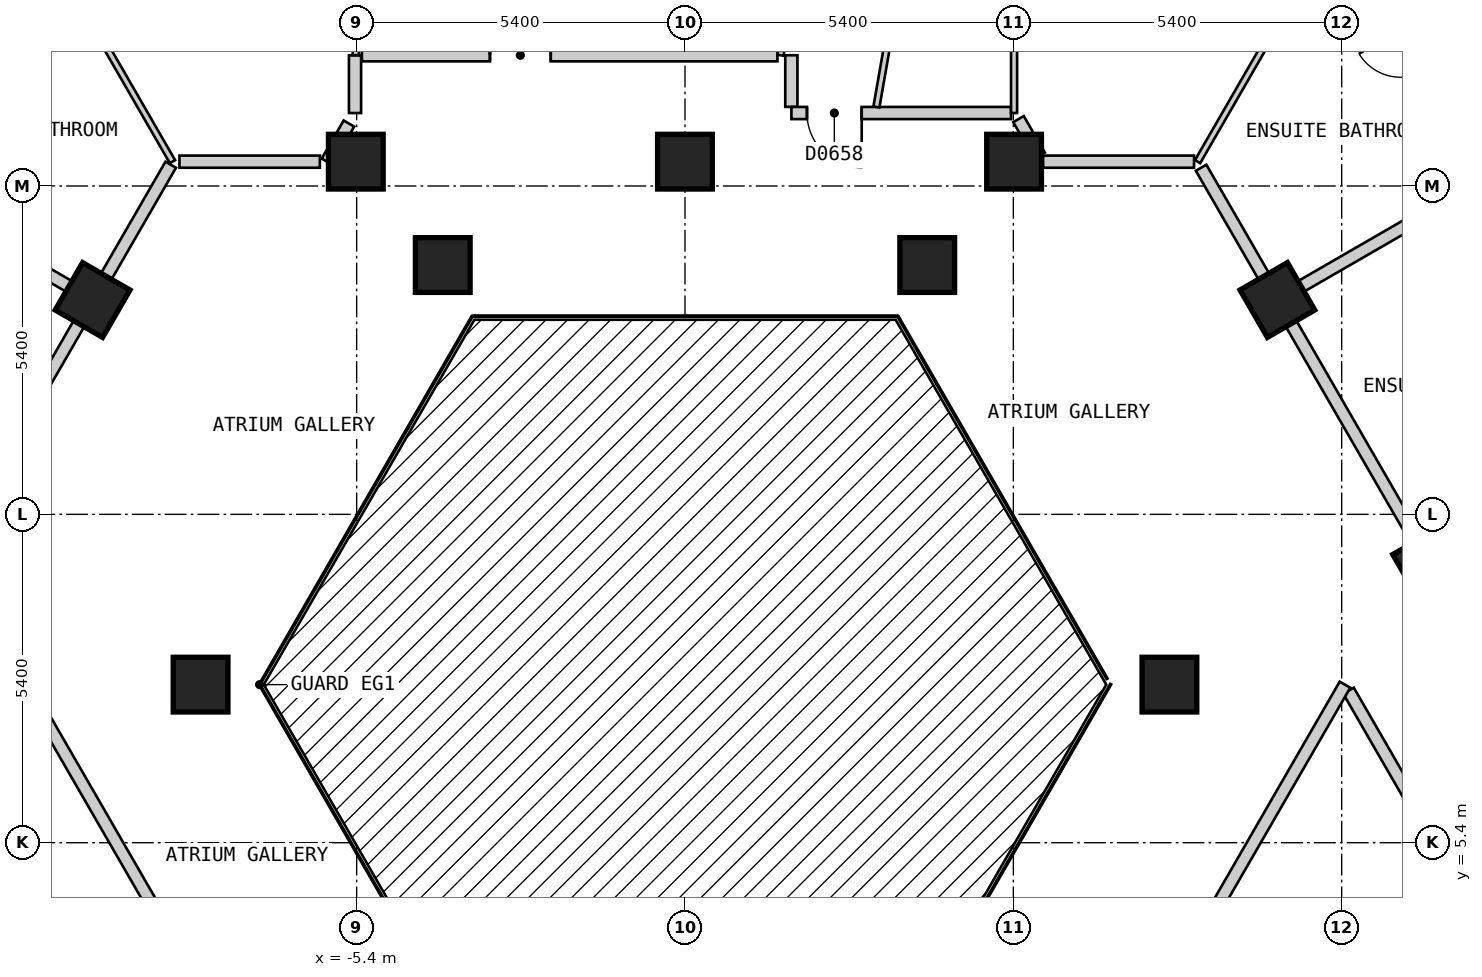
"""IFC4 building model, lengths in metres.
Left out: names, types, materials, properties, quantities, classifications, styles, units other than length and angle.
Written with IfcOpenShell. Run it as: python <this file> out.ifc"""

import sys

from ifc_helpers import new_model, si_unit, direction, frame, frame_2d, origin, origin_2d, place, context, subcontext, project, spatial, rectangle, extrude, element, fill, save


model = new_model("IFC4")
c1 = context("Model", 3, precision=1e-05, world=origin(), true_north=direction((0.0, 1.0)))
c2 = subcontext(c1, "Body", "Model", "MODEL_VIEW")
j1 = project(units=[si_unit("LENGTHUNIT", "METRE"), si_unit("PLANEANGLEUNIT", "RADIAN")], contexts=[c1])
p1 = place(None, origin())
s1 = spatial("IfcSite", under=j1, at=p1, CompositionType="ELEMENT")
p2 = place(p1, origin())
s2 = spatial("IfcBuilding", under=s1, at=p2, CompositionType="ELEMENT")
p3 = place(p2, frame((0.0, 0.0, 75.0)))
s3 = spatial("IfcBuildingStorey", under=s2, at=p3, CompositionType="ELEMENT", Elevation=75.0)
for number, where, z_axis, x_axis in (
    (1, (12.255, 9.975, 0.0), (0.0, 0.0, 1.0), (-0.5, 0.866, 0.0)),
    (2, (7.967, 8.0, 0.0), (0.0, 0.0, 1.0), (1.0, 0.0, 0.0)),
    (3, (9.743, 14.325, 0.0), (0.0, 0.0, 1.0), (-0.5, 0.866, 0.0)),
    (4, (5.412, 16.6, 0.0), (0.0, 0.0, 1.0), (-1.0, 0.0, 0.0)),
    (5, (3.984, 14.9, 0.0), (0.0, 0.0, 1.0), (1.0, 0.0, 0.0)),
    (6, (-0.001, 16.6, 0.0), (0.0, 0.0, 1.0), (-1.0, 0.0, 0.0)),
    (7, (-3.984, 14.9, 0.0), (0.0, 0.0, 1.0), (1.0, 0.0, 0.0)),
    (8, (-5.414, 16.6, 0.0), (0.0, 0.0, 1.0), (-1.0, 0.0, 0.0)),
    (9, (-9.743, 14.325, 0.0), (0.0, 0.0, 1.0), (-0.5, -0.866, 0.0)),
    (10, (-7.967, 8.0, 0.0), (0.0, 0.0, 1.0), (1.0, 0.0, 0.0)),
):
    element("IfcColumn", number, at=place(p3, frame(where, z_axis=z_axis, x_axis=x_axis)), inside=s3, PredefinedType="COLUMN", context=c2, shape_type="SweptSolid", body=[
        extrude(rectangle(XDim=0.9, YDim=0.9, at=origin_2d()), origin(), (0.0, 0.0, 1.0), 3.0),
    ])
p4 = place(p3, frame((-10.796, 7.899, 0.0), z_axis=(0.0, 0.0, 1.0), x_axis=(0.500010383074, -0.866019409031, 0.0)))
e11 = element("IfcWall", 11, at=p4, inside=s3, PredefinedType="PARTITIONING", context=c2, shape_type="SweptSolid", body=[
    extrude(rectangle(XDim=7.535, YDim=0.2, at=frame_2d((3.768, 0.0))), origin(), (0.0, 0.0, 1.0), 2.7),
])
p5 = place(p3, frame((5.485, 17.3, 0.0), z_axis=(0.0, 0.0, 1.0), x_axis=(0.499437640892, -0.866349838611, 0.0)))
e12 = element("IfcWall", 12, at=p5, inside=s3, PredefinedType="PARTITIONING", context=c2, shape_type="SweptSolid", body=[
    extrude(rectangle(XDim=0.693, YDim=0.2, at=frame_2d((0.346, 0.0))), origin(), (0.0, 0.0, 1.0), 2.7),
])
p6 = place(p3, frame((10.913, 7.899, 0.0), z_axis=(0.0, 0.0, 1.0), x_axis=(0.500028940566, -0.866008694296, 0.0)))
e13 = element("IfcWall", 13, at=p6, inside=s3, PredefinedType="PARTITIONING", context=c2, shape_type="SweptSolid", body=[
    extrude(rectangle(XDim=10.159, YDim=0.2, at=frame_2d((5.08, 0.0))), origin(), (0.0, 0.0, 1.0), 2.7),
])
p7 = place(p6, frame((4.63, 0.0, 0.0)))
e14 = element("IfcOpeningElement", 14, at=p7, cuts=e13, PredefinedType="OPENING", context=c2, shape_type="SweptSolid", body=[
    extrude(rectangle(XDim=0.9, YDim=2.1, at=frame_2d((0.45, 1.05))), frame((0.0, 0.11, 0.0), z_axis=(0.0, -1.0, 0.0), x_axis=(1.0, 0.0, 0.0)), (0.0, 0.0, 1.0), 0.22),
])
p8 = place(p3, frame((8.488, 16.5, 0.0), z_axis=(0.0, 0.0, 1.0), x_axis=(0.499986836607, -0.86603300354, 0.0)))
e15 = element("IfcWall", 15, at=p8, inside=s3, PredefinedType="PARTITIONING", context=c2, shape_type="SweptSolid", body=[
    extrude(rectangle(XDim=20.09, YDim=0.2, at=frame_2d((10.045, 0.0))), origin(), (0.0, 0.0, 1.0), 2.7),
])
p9 = place(p8, frame((14.569, 0.0, 0.0)))
e16 = element("IfcOpeningElement", 16, at=p9, cuts=e15, PredefinedType="OPENING", context=c2, shape_type="SweptSolid", body=[
    extrude(rectangle(XDim=1.0, YDim=2.1, at=frame_2d((0.5, 1.05))), frame((0.0, 0.11, 0.0), z_axis=(0.0, -1.0, 0.0), x_axis=(1.0, 0.0, 0.0)), (0.0, 0.0, 1.0), 0.22),
])
p10 = place(p3, frame((1.749, 18.35, 0.0), z_axis=(0.0, 0.0, 1.0), x_axis=(0.0, -1.0, 0.0)))
e17 = element("IfcWall", 17, at=p10, inside=s3, PredefinedType="PARTITIONING", context=c2, shape_type="SweptSolid", body=[
    extrude(rectangle(XDim=0.849, YDim=0.2, at=frame_2d((0.425, 0.0))), origin(), (0.0, 0.0, 1.0), 2.7),
])
p11 = place(p3, frame((-8.314, 16.6, 0.0), z_axis=(0.0, 0.0, 1.0), x_axis=(1.0, 0.0, 0.0)))
e18 = element("IfcWall", 18, at=p11, inside=s3, PredefinedType="PARTITIONING", context=c2, shape_type="SweptSolid", body=[
    extrude(rectangle(XDim=2.309, YDim=0.2, at=frame_2d((1.155, 0.0))), origin(), (0.0, 0.0, 1.0), 2.7),
])
p12 = place(p3, frame((5.889, 16.6, 0.0), z_axis=(0.0, 0.0, 1.0), x_axis=(1.0, 0.0, 0.0)))
e19 = element("IfcWall", 19, at=p12, inside=s3, PredefinedType="PARTITIONING", context=c2, shape_type="SweptSolid", body=[
    extrude(rectangle(XDim=2.483, YDim=0.2, at=frame_2d((1.242, 0.0))), origin(), (0.0, 0.0, 1.0), 2.7),
])
p13 = place(p3, frame((1.75, 17.4, 0.0), z_axis=(0.0, 0.0, 1.0), x_axis=(1.0, 0.0, 0.0)))
e20 = element("IfcWall", 20, at=p13, inside=s3, PredefinedType="PARTITIONING", context=c2, shape_type="SweptSolid", body=[
    extrude(rectangle(XDim=3.612, YDim=0.2, at=frame_2d((1.806, 0.0))), origin(), (0.0, 0.0, 1.0), 2.7),
])
p14 = place(p13, frame((0.256, 0.0, 0.0)))
e21 = element("IfcOpeningElement", 21, at=p14, cuts=e20, PredefinedType="OPENING", context=c2, shape_type="SweptSolid", body=[
    extrude(rectangle(XDim=0.9, YDim=2.1, at=frame_2d((0.45, 1.05))), frame((0.0, 0.11, 0.0), z_axis=(0.0, -1.0, 0.0), x_axis=(1.0, 0.0, 0.0)), (0.0, 0.0, 1.0), 0.22),
])
p15 = place(p3, frame((-5.314, 18.35, 0.0), z_axis=(0.0, 0.0, 1.0), x_axis=(1.0, 0.0, 0.0)))
e22 = element("IfcWall", 22, at=p15, inside=s3, PredefinedType="PARTITIONING", context=c2, shape_type="SweptSolid", body=[
    extrude(rectangle(XDim=6.834, YDim=0.2, at=frame_2d((3.417, 0.0))), origin(), (0.0, 0.0, 1.0), 2.7),
])
p16 = place(p15, frame((2.106, 0.0, 0.0)))
e23 = element("IfcOpeningElement", 23, at=p16, cuts=e22, PredefinedType="OPENING", context=c2, shape_type="SweptSolid", body=[
    extrude(rectangle(XDim=1.0, YDim=2.1, at=frame_2d((0.5, 1.05))), frame((0.0, 0.11, 0.0), z_axis=(0.0, -1.0, 0.0), x_axis=(1.0, 0.0, 0.0)), (0.0, 0.0, 1.0), 0.22),
])
p17 = place(p3, frame((6.928, 1.2, 0.0), z_axis=(0.0, 0.0, 1.0), x_axis=(0.500055327065, 0.865993458332, 0.0)))
e24 = element("IfcWall", 24, at=p17, inside=s3, PredefinedType="PARTITIONING", context=c2, shape_type="SweptSolid", body=[
    extrude(rectangle(XDim=7.851, YDim=0.2, at=frame_2d((3.926, 0.0))), origin(), (0.0, 0.0, 1.0), 2.7),
])
p18 = place(p3, frame((-5.889, 16.6, 0.0), z_axis=(0.0, 0.0, 1.0), x_axis=(0.499839240638, 0.866118198353, 0.0)))
e25 = element("IfcWall", 25, at=p18, inside=s3, PredefinedType="PARTITIONING", context=c2, shape_type="SweptSolid", body=[
    extrude(rectangle(XDim=0.724, YDim=0.2, at=frame_2d((0.362, 0.0))), origin(), (0.0, 0.0, 1.0), 2.7),
])
p19 = place(p3, frame((-18.562, -0.951, 0.0), z_axis=(0.0, 0.0, 1.0), x_axis=(0.499992962407, 0.866029466902, 0.0)))
e26 = element("IfcWall", 26, at=p19, inside=s3, PredefinedType="PARTITIONING", context=c2, shape_type="SweptSolid", body=[
    extrude(rectangle(XDim=20.208, YDim=0.2, at=frame_2d((10.104, 0.0))), origin(), (0.0, 0.0, 1.0), 2.7),
])
p20 = place(p19, frame((9.604, 0.0, 0.0)))
e27 = element("IfcOpeningElement", 27, at=p20, cuts=e26, PredefinedType="OPENING", context=c2, shape_type="SweptSolid", body=[
    extrude(rectangle(XDim=1.0, YDim=2.1, at=frame_2d((0.5, 1.05))), frame((0.0, 0.11, 0.0), z_axis=(0.0, -1.0, 0.0), x_axis=(1.0, 0.0, 0.0)), (0.0, 0.0, 1.0), 0.22),
])
p21 = place(p3, frame((-5.427, 17.4, 0.0), z_axis=(0.0, 0.0, 1.0), x_axis=(0.0, 1.0, 0.0)))
e28 = element("IfcWall", 28, at=p21, inside=s3, PredefinedType="PARTITIONING", context=c2, shape_type="SweptSolid", body=[
    extrude(rectangle(XDim=0.95, YDim=0.2, at=frame_2d((0.475, 0.0))), origin(), (0.0, 0.0, 1.0), 2.7),
])
p22 = place(p3, frame((10.738, 20.492, 0.0), z_axis=(0.0, 0.0, 1.0), x_axis=(0.518100976056, -0.855319459974, 0.0)))
e29 = element("IfcWall", 29, at=p22, inside=s3, PredefinedType="PARTITIONING", context=c2, shape_type="SweptSolid", body=[
    extrude(rectangle(XDim=4.744, YDim=0.1, at=frame_2d((2.372, 0.0))), origin(), (0.0, 0.0, 1.0), 2.7),
])
p23 = place(p22, frame((1.992, 0.0, 0.0)))
e30 = element("IfcOpeningElement", 30, at=p23, cuts=e29, PredefinedType="OPENING", context=c2, shape_type="SweptSolid", body=[
    extrude(rectangle(XDim=0.8, YDim=2.1, at=frame_2d((0.4, 1.05))), frame((0.0, 0.06, 0.0), z_axis=(0.0, -1.0, 0.0), x_axis=(1.0, 0.0, 0.0)), (0.0, 0.0, 1.0), 0.12),
])
p24 = place(p3, frame((-10.742, 20.606, 0.0), z_axis=(0.0, 0.0, 1.0), x_axis=(0.50003312339, -0.866006279142, 0.0)))
e31 = element("IfcWall", 31, at=p24, inside=s3, PredefinedType="PARTITIONING", context=c2, shape_type="SweptSolid", body=[
    extrude(rectangle(XDim=4.626, YDim=0.1, at=frame_2d((2.313, 0.0))), origin(), (0.0, 0.0, 1.0), 2.7),
])
p25 = place(p3, frame((8.43, 16.6, 0.0), z_axis=(0.0, 0.0, 1.0), x_axis=(0.499951460778, 0.866053426104, 0.0)))
e32 = element("IfcWall", 32, at=p25, inside=s3, PredefinedType="PARTITIONING", context=c2, shape_type="SweptSolid", body=[
    extrude(rectangle(XDim=4.553, YDim=0.1, at=frame_2d((2.276, 0.0))), origin(), (0.0, 0.0, 1.0), 2.7),
])
p26 = place(p3, frame((3.148, 17.5, 0.0), z_axis=(0.0, 0.0, 1.0), x_axis=(0.172821918451, 0.984953087463, 0.0)))
e33 = element("IfcWall", 33, at=p26, inside=s3, PredefinedType="PARTITIONING", context=c2, shape_type="SweptSolid", body=[
    extrude(rectangle(XDim=4.814, YDim=0.1, at=frame_2d((2.407, 0.0))), origin(), (0.0, 0.0, 1.0), 2.7),
])
p27 = place(p26, frame((1.932, 0.0, 0.0)))
e34 = element("IfcOpeningElement", 34, at=p27, cuts=e33, PredefinedType="OPENING", context=c2, shape_type="SweptSolid", body=[
    extrude(rectangle(XDim=0.9, YDim=2.1, at=frame_2d((0.45, 1.05))), frame((0.0, 0.06, 0.0), z_axis=(0.0, -1.0, 0.0), x_axis=(1.0, 0.0, 0.0)), (0.0, 0.0, 1.0), 0.12),
])
p28 = place(p3, frame((1.571, 18.35, 0.0), z_axis=(0.0, 0.0, 1.0), x_axis=(0.172742546726, 0.984967010895, 0.0)))
e35 = element("IfcWall", 35, at=p28, inside=s3, PredefinedType="PARTITIONING", context=c2, shape_type="SweptSolid", body=[
    extrude(rectangle(XDim=4.087, YDim=0.1, at=frame_2d((2.044, 0.0))), origin(), (0.0, 0.0, 1.0), 2.7),
])
p29 = place(p28, frame((1.644, 0.0, 0.0)))
e36 = element("IfcOpeningElement", 36, at=p29, cuts=e35, PredefinedType="OPENING", context=c2, shape_type="SweptSolid", body=[
    extrude(rectangle(XDim=0.8, YDim=2.1, at=frame_2d((0.4, 1.05))), frame((0.0, 0.06, 0.0), z_axis=(0.0, -1.0, 0.0), x_axis=(1.0, 0.0, 0.0)), (0.0, 0.0, 1.0), 0.12),
])
p30 = place(p3, frame((5.412, 17.4, 0.0), z_axis=(0.0, 0.0, 1.0), x_axis=(0.0, 1.0, 0.0)))
e37 = element("IfcWall", 37, at=p30, inside=s3, PredefinedType="PARTITIONING", context=c2, shape_type="SweptSolid", body=[
    extrude(rectangle(XDim=4.822, YDim=0.1, at=frame_2d((2.411, 0.0))), origin(), (0.0, 0.0, 1.0), 2.7),
])
p31 = place(p3, frame((-5.414, 18.35, 0.0), z_axis=(0.0, 0.0, 1.0), x_axis=(0.0, 1.0, 0.0)))
e38 = element("IfcWall", 38, at=p31, inside=s3, PredefinedType="PARTITIONING", context=c2, shape_type="SweptSolid", body=[
    extrude(rectangle(XDim=4.15, YDim=0.1, at=frame_2d((2.075, 0.0))), origin(), (0.0, 0.0, 1.0), 2.7),
])
for number, where, z_axis, x_axis in (
    (39, (-18.489, 19.375, 0.0), (0.0, 0.0, 1.0), (0.866, -0.5, 0.0)),
    (40, (9.83, 14.375, 0.0), (0.0, 0.0, 1.0), (0.866, 0.5, 0.0)),
):
    element("IfcWall", number, at=place(p3, frame(where, z_axis=z_axis, x_axis=x_axis)), inside=s3, PredefinedType="PARTITIONING", context=c2, shape_type="SweptSolid", body=[
        extrude(rectangle(XDim=10.0, YDim=0.2, at=frame_2d((5.0, 0.0))), origin(), (0.0, 0.0, 1.0), 2.7),
    ])
p32 = place(p16, origin())
e41 = element("IfcDoor", 41, at=p32, inside=s3, OperationType="SINGLE_SWING_LEFT", PredefinedType="DOOR", context=c2, shape_type="SweptSolid", body=[
    extrude(rectangle(XDim=1.0, YDim=2.1, at=frame_2d((0.5, 1.05))), frame((0.0, 0.025, 0.0), z_axis=(0.0, -1.0, 0.0), x_axis=(1.0, 0.0, 0.0)), (0.0, 0.0, 1.0), 0.05),
])
fill(e23, e41)
p33 = place(p14, origin())
e42 = element("IfcDoor", 42, at=p33, inside=s3, OperationType="SINGLE_SWING_RIGHT", PredefinedType="DOOR", context=c2, shape_type="SweptSolid", body=[
    extrude(rectangle(XDim=0.9, YDim=2.1, at=frame_2d((0.45, 1.05))), frame((0.0, 0.025, 0.0), z_axis=(0.0, -1.0, 0.0), x_axis=(1.0, 0.0, 0.0)), (0.0, 0.0, 1.0), 0.05),
])
fill(e21, e42)
p34 = place(p23, origin())
e43 = element("IfcDoor", 43, at=p34, inside=s3, OperationType="SINGLE_SWING_LEFT", PredefinedType="DOOR", context=c2, shape_type="SweptSolid", body=[
    extrude(rectangle(XDim=0.8, YDim=2.1, at=frame_2d((0.4, 1.05))), frame((0.0, 0.025, 0.0), z_axis=(0.0, -1.0, 0.0), x_axis=(1.0, 0.0, 0.0)), (0.0, 0.0, 1.0), 0.05),
])
fill(e30, e43)
save(model, sys.argv[1])
